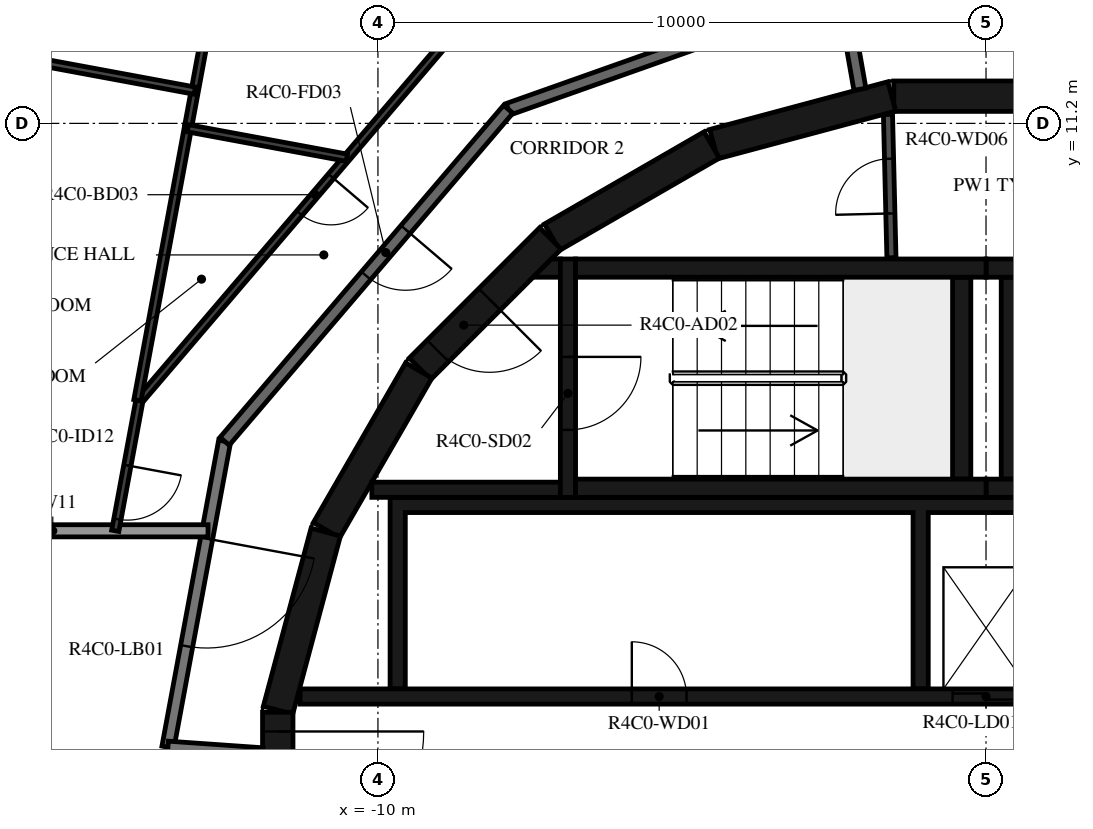
"""IFC4 building model, lengths in metres.
Left out: names, types, materials, properties, quantities, classifications, styles, units other than length and angle.
Written with IfcOpenShell. Run it as: python <this file> out.ifc"""

import sys

from ifc_helpers import new_model, si_unit, direction, frame, frame_2d, origin, place, context, subcontext, project, spatial, polyline, rectangle, outline, extrude, element, fill, save


model = new_model("IFC4")
c1 = context("Model", 3, precision=1e-05, world=origin(), true_north=direction((0.0, 1.0)))
c2 = subcontext(c1, "Body", "Model", "MODEL_VIEW")
j1 = project(units=[si_unit("LENGTHUNIT", "METRE"), si_unit("PLANEANGLEUNIT", "RADIAN")], contexts=[c1])
p1 = place(None, origin())
s1 = spatial("IfcSite", under=j1, at=p1, CompositionType="ELEMENT")
p2 = place(p1, origin())
s2 = spatial("IfcBuilding", under=s1, at=p2, CompositionType="ELEMENT")
p3 = place(p2, frame((0.0, 0.0, 172.7)))
s3 = spatial("IfcBuildingStorey", under=s2, at=p3, CompositionType="ELEMENT", Elevation=172.7)
for number, where, z_axis, x_axis in (
    (1, (1.516, 11.647, 0.0), (0.0, 0.0, 1.0), (-1.0, 0.0, 0.0)),
    (2, (-1.55, 11.643, 0.0), (0.0, 0.0, 1.0), (-0.966, -0.259, 0.0)),
    (3, (-4.51, 10.845, 0.0), (0.0, 0.0, 1.0), (-0.866, -0.5, 0.0)),
):
    element("IfcWall", number, at=place(p3, frame(where, z_axis=z_axis, x_axis=x_axis)), inside=s3, PredefinedType="SHEAR", context=c2, shape_type="SweptSolid", body=[
        extrude(rectangle(XDim=3.033, YDim=0.5, at=frame_2d((1.516, 0.0))), origin(), (0.0, 0.0, 1.0), 3.12),
    ])
p4 = place(p3, frame((-7.164, 9.308, 0.0), z_axis=(0.0, 0.0, 1.0), x_axis=(-0.707106781187, -0.707106781187, 0.0)))
e4 = element("IfcWall", 4, at=p4, inside=s3, PredefinedType="SHEAR", context=c2, shape_type="SweptSolid", body=[
    extrude(rectangle(XDim=3.032, YDim=0.5, at=frame_2d((1.516, 0.0))), origin(), (0.0, 0.0, 1.0), 3.12),
])
p5 = place(p4, frame((1.416, 0.0, 0.0)))
e5 = element("IfcOpeningElement", 5, at=p5, cuts=e4, PredefinedType="OPENING", context=c2, shape_type="SweptSolid", body=[
    extrude(rectangle(XDim=1.2, YDim=2.1, at=frame_2d((0.6, 1.05))), frame((0.0, 0.26, 0.0), z_axis=(0.0, -1.0, 0.0), x_axis=(1.0, 0.0, 0.0)), (0.0, 0.0, 1.0), 0.52),
])
for number, where, z_axis, x_axis in (
    (6, (-9.329, 7.137, 0.0), (0.0, 0.0, 1.0), (-0.5, -0.866, 0.0)),
    (7, (-10.858, 4.479, 0.0), (0.0, 0.0, 1.0), (-0.259, -0.966, 0.0)),
):
    element("IfcWall", number, at=place(p3, frame(where, z_axis=z_axis, x_axis=x_axis)), inside=s3, PredefinedType="SHEAR", context=c2, shape_type="SweptSolid", body=[
        extrude(rectangle(XDim=3.033, YDim=0.5, at=frame_2d((1.516, 0.0))), origin(), (0.0, 0.0, 1.0), 3.12),
    ])
p6 = place(p3, frame((-11.647, 1.516, 0.0), z_axis=(0.0, 0.0, 1.0), x_axis=(0.0, -1.0, 0.0)))
e8 = element("IfcWall", 8, at=p6, inside=s3, PredefinedType="SHEAR", context=c2, shape_type="SweptSolid", body=[
    extrude(rectangle(XDim=3.033, YDim=0.5, at=frame_2d((1.516, 0.0))), origin(), (0.0, 0.0, 1.0), 3.12),
])
p7 = place(p6, frame((0.316, 0.0, 0.0)))
e9 = element("IfcOpeningElement", 9, at=p7, cuts=e8, PredefinedType="OPENING", context=c2, shape_type="SweptSolid", body=[
    extrude(rectangle(XDim=2.4, YDim=2.1, at=frame_2d((1.2, 1.05))), frame((0.0, 0.26, 0.0), z_axis=(0.0, -1.0, 0.0), x_axis=(1.0, 0.0, 0.0)), (0.0, 0.0, 1.0), 0.52),
])
for number, where, z_axis, x_axis in (
    (10, (0.0, 5.2, 0.0), (0.0, 0.0, 1.0), (1.0, 0.0, 0.0)),
    (11, (0.0, 8.82, 0.0), (0.0, 0.0, 1.0), (1.0, 0.0, 0.0)),
):
    element("IfcWall", number, at=place(p3, frame(where, z_axis=z_axis, x_axis=x_axis)), inside=s3, PredefinedType="SHEAR", context=c2, shape_type="SweptSolid", body=[
        extrude(rectangle(XDim=6.75, YDim=0.3, at=frame_2d((3.375, 0.0))), origin(), (0.0, 0.0, 1.0), 3.12),
    ])
p8 = place(p3, frame((0.4, 5.35, 0.0), z_axis=(0.0, 0.0, 1.0), x_axis=(0.0, 1.0, 0.0)))
e12 = element("IfcWall", 12, at=p8, inside=s3, PredefinedType="SHEAR", context=c2, shape_type="SweptSolid", body=[
    extrude(rectangle(XDim=3.32, YDim=0.3, at=frame_2d((1.66, 0.0))), origin(), (0.0, 0.0, 1.0), 3.12),
])
for number, where, z_axis, x_axis in (
    (13, (-6.75, 5.2, 0.0), (0.0, 0.0, 1.0), (1.0, 0.0, 0.0)),
    (14, (-6.75, 8.82, 0.0), (0.0, 0.0, 1.0), (1.0, 0.0, 0.0)),
):
    element("IfcWall", number, at=place(p3, frame(where, z_axis=z_axis, x_axis=x_axis)), inside=s3, PredefinedType="SHEAR", context=c2, shape_type="SweptSolid", body=[
        extrude(rectangle(XDim=6.75, YDim=0.3, at=frame_2d((3.375, 0.0))), origin(), (0.0, 0.0, 1.0), 3.12),
    ])
p9 = place(p3, frame((-0.4, 5.35, 0.0), z_axis=(0.0, 0.0, 1.0), x_axis=(0.0, 1.0, 0.0)))
e15 = element("IfcWall", 15, at=p9, inside=s3, PredefinedType="SHEAR", context=c2, shape_type="SweptSolid", body=[
    extrude(rectangle(XDim=3.32, YDim=0.3, at=frame_2d((1.66, 0.0))), origin(), (0.0, 0.0, 1.0), 3.12),
])
p10 = place(p3, frame((-6.875, 8.97, 0.0), z_axis=(0.0, 0.0, 1.0), x_axis=(0.0, -1.0, 0.0)))
e16 = element("IfcWall", 16, at=p10, inside=s3, PredefinedType="SHEAR", context=c2, shape_type="SweptSolid", body=[
    extrude(rectangle(XDim=3.92, YDim=0.25, at=frame_2d((1.96, 0.0))), origin(), (0.0, 0.0, 1.0), 3.12),
])
p11 = place(p10, frame((1.61, 0.0, 0.0)))
e17 = element("IfcOpeningElement", 17, at=p11, cuts=e16, PredefinedType="OPENING", context=c2, shape_type="SweptSolid", body=[
    extrude(rectangle(XDim=1.2, YDim=2.1, at=frame_2d((0.6, 1.05))), frame((0.0, 0.135, 0.0), z_axis=(0.0, -1.0, 0.0), x_axis=(1.0, 0.0, 0.0)), (0.0, 0.0, 1.0), 0.27),
])
p12 = place(p3, frame((-7.0, 5.175, 0.0), z_axis=(0.0, 0.0, 1.0), x_axis=(-1.0, 0.0, 0.0)))
e18 = element("IfcWall", 18, at=p12, inside=s3, PredefinedType="SHEAR", context=c2, shape_type="SweptSolid", body=[
    extrude(rectangle(XDim=3.1, YDim=0.25, at=frame_2d((1.55, 0.0))), origin(), (0.0, 0.0, 1.0), 3.12),
])
p13 = place(p3, origin())
e19 = element("IfcWall", 19, at=p13, inside=s3, PredefinedType="SHEAR", context=c2, shape_type="SweptSolid", body=[
    extrude(outline(polyline([(-7.148, 8.97), (-7.0, 8.97), (-7.0, 8.67), (-7.448, 8.67), (-7.148, 8.97)])), origin(), (0.0, 0.0, 1.0), 3.12),
])
p14 = place(p3, origin())
e20 = element("IfcWall", 20, at=p14, inside=s3, PredefinedType="SHEAR", context=c2, shape_type="SweptSolid", body=[
    extrude(outline(polyline([(-9.55, 4.8), (-1.2, 4.8), (-1.2, 1.9), (-0.95, 1.9), (-0.95, 4.8), (0.95, 4.8), (0.95, 1.9), (1.2, 1.9), (1.2, 4.8), (3.1, 4.8), (3.1, 1.9), (3.35, 1.9), (3.35, 4.8), (5.25, 4.8), (5.25, 1.9), (5.5, 1.9), (5.5, 4.8), (7.4, 4.8), (7.4, 1.9), (7.65, 1.9), (7.65, 4.8), (9.55, 4.8), (9.55, 1.9), (9.8, 1.9), (9.8, 4.8), (9.8, 5.05), (-9.8, 5.05), (-9.8, 4.8), (-9.8, 1.9), (-9.55, 1.9), (-9.55, 4.8)])), origin(), (0.0, 0.0, 1.0), 3.12),
])
p15 = place(p3, frame((-11.28, 1.775, 0.0), z_axis=(0.0, 0.0, 1.0), x_axis=(1.0, 0.0, 0.0)))
e21 = element("IfcWall", 21, at=p15, inside=s3, PredefinedType="SHEAR", context=c2, shape_type="SweptSolid", body=[
    extrude(rectangle(XDim=14.38, YDim=0.25, at=frame_2d((7.19, 0.0))), origin(), (0.0, 0.0, 1.0), 3.12),
])
p16 = place(p15, frame((10.73, 0.0, 0.0)))
e22 = element("IfcOpeningElement", 22, at=p16, cuts=e21, PredefinedType="OPENING", context=c2, shape_type="SweptSolid", body=[
    extrude(rectangle(XDim=1.1, YDim=2.1, at=frame_2d((0.55, 1.05))), frame((0.0, 0.135, 0.0), z_axis=(0.0, -1.0, 0.0), x_axis=(1.0, 0.0, 0.0)), (0.0, 0.0, 1.0), 0.27),
])
p17 = place(p15, frame((12.88, 0.0, 0.0)))
e23 = element("IfcOpeningElement", 23, at=p17, cuts=e21, PredefinedType="OPENING", context=c2, shape_type="SweptSolid", body=[
    extrude(rectangle(XDim=1.1, YDim=2.1, at=frame_2d((0.55, 1.05))), frame((0.0, 0.135, 0.0), z_axis=(0.0, -1.0, 0.0), x_axis=(1.0, 0.0, 0.0)), (0.0, 0.0, 1.0), 0.27),
])
p18 = place(p15, frame((5.455, 0.0, 0.0)))
e24 = element("IfcOpeningElement", 24, at=p18, cuts=e21, PredefinedType="OPENING", context=c2, shape_type="SweptSolid", body=[
    extrude(rectangle(XDim=0.9, YDim=2.1, at=frame_2d((0.45, 1.05))), frame((0.0, 0.135, 0.0), z_axis=(0.0, -1.0, 0.0), x_axis=(1.0, 0.0, 0.0)), (0.0, 0.0, 1.0), 0.27),
])
p19 = place(p3, frame((-1.555, 8.99, 0.0), z_axis=(0.0, 0.0, 1.0), x_axis=(-0.024125549686, 0.999708936567, 0.0)))
e25 = element("IfcWall", 25, at=p19, inside=s3, PredefinedType="PARTITIONING", context=c2, shape_type="SweptSolid", body=[
    extrude(rectangle(XDim=2.358, YDim=0.15, at=frame_2d((1.179, 0.0))), origin(), (0.0, 0.0, 1.0), 3.12),
])
p20 = place(p19, frame((0.729, 0.0, 0.0)))
e26 = element("IfcOpeningElement", 26, at=p20, cuts=e25, PredefinedType="OPENING", context=c2, shape_type="SweptSolid", body=[
    extrude(rectangle(XDim=0.9, YDim=2.1, at=frame_2d((0.45, 1.05))), frame((0.0, 0.085, 0.0), z_axis=(0.0, -1.0, 0.0), x_axis=(1.0, 0.0, 0.0)), (0.0, 0.0, 1.0), 0.17),
])
p21 = place(p3, frame((-12.521, 5.972, 0.0), z_axis=(0.0, 0.0, 1.0), x_axis=(-0.182251559718, -0.983251935661, 0.0)))
e27 = element("IfcWall", 27, at=p21, inside=s3, PredefinedType="STANDARD", context=c2, shape_type="SweptSolid", body=[
    extrude(rectangle(XDim=5.117, YDim=0.2, at=frame_2d((2.559, 0.0))), origin(), (0.0, 0.0, 1.0), 3.12),
])
p22 = place(p21, frame((1.627, 0.0, 0.0)))
e28 = element("IfcOpeningElement", 28, at=p22, cuts=e27, PredefinedType="OPENING", context=c2, shape_type="SweptSolid", body=[
    extrude(rectangle(XDim=1.8, YDim=2.1, at=frame_2d((0.9, 1.05))), frame((0.0, 0.11, 0.0), z_axis=(0.0, -1.0, 0.0), x_axis=(1.0, 0.0, 0.0)), (0.0, 0.0, 1.0), 0.22),
])
p23 = place(p3, frame((-13.454, 0.941, 0.0), z_axis=(0.0, 0.0, 1.0), x_axis=(0.99755155062, -0.069934997354, 0.0)))
e29 = element("IfcWall", 29, at=p23, inside=s3, PredefinedType="STANDARD", context=c2, shape_type="SweptSolid", body=[
    extrude(rectangle(XDim=1.561, YDim=0.2, at=frame_2d((0.78, 0.0))), origin(), (0.0, 0.0, 1.0), 3.12),
])
p24 = place(p3, frame((-2.074, 11.761, 0.0), z_axis=(0.0, 0.0, 1.0), x_axis=(-0.1736412798, 0.984808969267, 0.0)))
e30 = element("IfcWall", 30, at=p24, inside=s3, PredefinedType="STANDARD", context=c2, shape_type="SweptSolid", body=[
    extrude(rectangle(XDim=1.644, YDim=0.2, at=frame_2d((0.822, 0.0))), origin(), (0.0, 0.0, 1.0), 3.12),
])
p25 = place(p3, frame((-2.359, 13.38, 0.0), z_axis=(0.0, 0.0, 1.0), x_axis=(-0.942647529236, -0.333789807551, 0.0)))
e31 = element("IfcWall", 31, at=p25, inside=s3, PredefinedType="STANDARD", context=c2, shape_type="SweptSolid", body=[
    extrude(rectangle(XDim=5.833, YDim=0.2, at=frame_2d((2.917, 0.0))), origin(), (0.0, 0.0, 1.0), 3.12),
])
p26 = place(p3, frame((-7.858, 11.433, 0.0), z_axis=(0.0, 0.0, 1.0), x_axis=(-0.649440801937, -0.760412154545, 0.0)))
e32 = element("IfcWall", 32, at=p26, inside=s3, PredefinedType="STANDARD", context=c2, shape_type="SweptSolid", body=[
    extrude(rectangle(XDim=7.181, YDim=0.2, at=frame_2d((3.59, 0.0))), origin(), (0.0, 0.0, 1.0), 3.12),
])
p27 = place(p26, frame((2.6, 0.0, 0.0)))
e33 = element("IfcOpeningElement", 33, at=p27, cuts=e32, PredefinedType="OPENING", context=c2, shape_type="SweptSolid", body=[
    extrude(rectangle(XDim=1.0, YDim=2.1, at=frame_2d((0.5, 1.05))), frame((0.0, 0.11, 0.0), z_axis=(0.0, -1.0, 0.0), x_axis=(1.0, 0.0, 0.0)), (0.0, 0.0, 1.0), 0.22),
])
p28 = place(p3, frame((-12.794, 4.5, 0.0), z_axis=(0.0, 0.0, 1.0), x_axis=(-1.0, 0.0, 0.0)))
e34 = element("IfcWall", 34, at=p28, inside=s3, PredefinedType="STANDARD", context=c2, shape_type="SweptSolid", body=[
    extrude(rectangle(XDim=5.106, YDim=0.2, at=frame_2d((2.553, 0.0))), origin(), (0.0, 0.0, 1.0), 2.73),
])
p29 = place(p3, frame((8.702, 12.206, 0.0), z_axis=(0.0, 0.0, 1.0), x_axis=(-0.760401313718, 0.649453494945, 0.0)))
e35 = element("IfcWall", 35, at=p29, inside=s3, PredefinedType="PARTITIONING", context=c2, shape_type="SweptSolid", body=[
    extrude(rectangle(XDim=16.724, YDim=0.12, at=frame_2d((8.362, 0.0))), origin(), (0.0, 0.0, 1.0), 3.12),
])
p30 = place(p29, frame((0.2, 0.0, 0.0)))
e36 = element("IfcOpeningElement", 36, at=p30, cuts=e35, PredefinedType="OPENING", context=c2, shape_type="SweptSolid", body=[
    extrude(rectangle(XDim=0.9, YDim=2.1, at=frame_2d((0.45, 1.05))), frame((0.0, 0.07, 0.0), z_axis=(0.0, -1.0, 0.0), x_axis=(1.0, 0.0, 0.0)), (0.0, 0.0, 1.0), 0.14),
])
p31 = place(p29, frame((8.02, 0.0, 0.0)))
e37 = element("IfcOpeningElement", 37, at=p31, cuts=e35, PredefinedType="OPENING", context=c2, shape_type="SweptSolid", body=[
    extrude(rectangle(XDim=0.9, YDim=2.1, at=frame_2d((0.45, 1.05))), frame((0.0, 0.07, 0.0), z_axis=(0.0, -1.0, 0.0), x_axis=(1.0, 0.0, 0.0)), (0.0, 0.0, 1.0), 0.14),
])
p32 = place(p29, frame((14.412, 0.0, 0.0)))
e38 = element("IfcOpeningElement", 38, at=p32, cuts=e35, PredefinedType="OPENING", context=c2, shape_type="SweptSolid", body=[
    extrude(rectangle(XDim=0.9, YDim=2.1, at=frame_2d((0.45, 1.05))), frame((0.0, 0.07, 0.0), z_axis=(0.0, -1.0, 0.0), x_axis=(1.0, 0.0, 0.0)), (0.0, 0.0, 1.0), 0.14),
])
p33 = place(p3, frame((-8.774, 12.669, 0.0), z_axis=(0.0, 0.0, 1.0), x_axis=(-0.649446157105, -0.760407580855, 0.0)))
e39 = element("IfcWall", 39, at=p33, inside=s3, PredefinedType="PARTITIONING", context=c2, shape_type="SweptSolid", body=[
    extrude(rectangle(XDim=7.927, YDim=0.12, at=frame_2d((3.964, 0.0))), origin(), (0.0, 0.0, 1.0), 3.12),
])
p34 = place(p33, frame((3.074, 0.0, 0.0)))
e40 = element("IfcOpeningElement", 40, at=p34, cuts=e39, PredefinedType="OPENING", context=c2, shape_type="SweptSolid", body=[
    extrude(rectangle(XDim=0.8, YDim=2.1, at=frame_2d((0.4, 1.05))), frame((0.0, 0.07, 0.0), z_axis=(0.0, -1.0, 0.0), x_axis=(1.0, 0.0, 0.0)), (0.0, 0.0, 1.0), 0.14),
])
p35 = place(p3, frame((-13.923, 6.641, 0.0), z_axis=(0.0, 0.0, 1.0), x_axis=(-0.182209715759, -0.983259690765, 0.0)))
e41 = element("IfcWall", 41, at=p35, inside=s3, PredefinedType="PARTITIONING", context=c2, shape_type="SweptSolid", body=[
    extrude(rectangle(XDim=2.177, YDim=0.12, at=frame_2d((1.089, 0.0))), origin(), (0.0, 0.0, 1.0), 3.12),
])
p36 = place(p35, frame((1.083, 0.0, 0.0)))
e42 = element("IfcOpeningElement", 42, at=p36, cuts=e41, PredefinedType="OPENING", context=c2, shape_type="SweptSolid", body=[
    extrude(rectangle(XDim=0.9, YDim=2.1, at=frame_2d((0.45, 1.05))), frame((0.0, 0.07, 0.0), z_axis=(0.0, -1.0, 0.0), x_axis=(1.0, 0.0, 0.0)), (0.0, 0.0, 1.0), 0.14),
])
p37 = place(p3, frame((-13.955, 6.647, 0.0), z_axis=(0.0, 0.0, 1.0), x_axis=(0.182264522222, 0.983249532896, 0.0)))
e43 = element("IfcWall", 43, at=p37, inside=s3, PredefinedType="PARTITIONING", context=c2, shape_type="SweptSolid", body=[
    extrude(rectangle(XDim=4.589, YDim=0.12, at=frame_2d((2.294, 0.0))), origin(), (0.0, 0.0, 1.0), 3.12),
])
p38 = place(p3, frame((-11.396, 20.453, 0.0), z_axis=(0.0, 0.0, 1.0), x_axis=(-0.182223370439, -0.983257160292, 0.0)))
e44 = element("IfcWall", 44, at=p38, inside=s3, PredefinedType="PARTITIONING", context=c2, shape_type="SweptSolid", body=[
    extrude(rectangle(XDim=9.452, YDim=0.12, at=frame_2d((4.726, 0.0))), origin(), (0.0, 0.0, 1.0), 3.12),
])
p39 = place(p38, frame((3.319, 0.0, 0.0)))
e45 = element("IfcOpeningElement", 45, at=p39, cuts=e44, PredefinedType="OPENING", context=c2, shape_type="SweptSolid", body=[
    extrude(rectangle(XDim=0.9, YDim=2.1, at=frame_2d((0.45, 1.05))), frame((0.0, 0.07, 0.0), z_axis=(0.0, -1.0, 0.0), x_axis=(1.0, 0.0, 0.0)), (0.0, 0.0, 1.0), 0.14),
])
p40 = place(p38, frame((0.2, 0.0, 0.0)))
e46 = element("IfcOpeningElement", 46, at=p40, cuts=e44, PredefinedType="OPENING", context=c2, shape_type="SweptSolid", body=[
    extrude(rectangle(XDim=0.9, YDim=2.1, at=frame_2d((0.45, 1.05))), frame((0.0, 0.07, 0.0), z_axis=(0.0, -1.0, 0.0), x_axis=(1.0, 0.0, 0.0)), (0.0, 0.0, 1.0), 0.14),
])
p41 = place(p3, frame((-13.126, 11.12, 0.0), z_axis=(0.0, 0.0, 1.0), x_axis=(0.983257646361, -0.182220747645, 0.0)))
e47 = element("IfcWall", 47, at=p41, inside=s3, PredefinedType="PARTITIONING", context=c2, shape_type="SweptSolid", body=[
    extrude(rectangle(XDim=2.659, YDim=0.12, at=frame_2d((1.33, 0.0))), origin(), (0.0, 0.0, 1.0), 3.12),
])
p42 = place(p3, frame((-16.552, 12.394, 0.0), z_axis=(0.0, 0.0, 1.0), x_axis=(0.983257712156, -0.182220392618, 0.0)))
e48 = element("IfcWall", 48, at=p42, inside=s3, PredefinedType="PARTITIONING", context=c2, shape_type="SweptSolid", body=[
    extrude(rectangle(XDim=3.6, YDim=0.12, at=frame_2d((1.8, 0.0))), origin(), (0.0, 0.0, 1.0), 2.73),
])
p43 = place(p11, origin())
e49 = element("IfcDoor", 49, at=p43, inside=s3, OperationType="SINGLE_SWING_LEFT", PredefinedType="DOOR", context=c2, shape_type="SweptSolid", body=[
    extrude(rectangle(XDim=1.2, YDim=2.1, at=frame_2d((0.6, 1.05))), frame((0.0, 0.025, 0.0), z_axis=(0.0, -1.0, 0.0), x_axis=(1.0, 0.0, 0.0)), (0.0, 0.0, 1.0), 0.05),
])
fill(e17, e49)
p44 = place(p5, origin())
e50 = element("IfcDoor", 50, at=p44, inside=s3, OperationType="SINGLE_SWING_RIGHT", PredefinedType="DOOR", context=c2, shape_type="SweptSolid", body=[
    extrude(rectangle(XDim=1.2, YDim=2.1, at=frame_2d((0.6, 1.05))), frame((0.0, 0.025, 0.0), z_axis=(0.0, -1.0, 0.0), x_axis=(1.0, 0.0, 0.0)), (0.0, 0.0, 1.0), 0.05),
])
fill(e5, e50)
p45 = place(p7, origin())
e51 = element("IfcDoor", 51, at=p45, inside=s3, OperationType="DOUBLE_DOOR_SINGLE_SWING", PredefinedType="DOOR", context=c2, shape_type="SweptSolid", body=[
    extrude(rectangle(XDim=2.4, YDim=2.1, at=frame_2d((1.2, 1.05))), frame((0.0, 0.025, 0.0), z_axis=(0.0, -1.0, 0.0), x_axis=(1.0, 0.0, 0.0)), (0.0, 0.0, 1.0), 0.05),
])
fill(e9, e51)
p46 = place(p16, origin())
e52 = element("IfcDoor", 52, at=p46, inside=s3, OperationType="DOUBLE_DOOR_SLIDING", PredefinedType="DOOR", context=c2, shape_type="SweptSolid", body=[
    extrude(rectangle(XDim=1.1, YDim=2.1, at=frame_2d((0.55, 1.05))), frame((0.0, 0.025, 0.0), z_axis=(0.0, -1.0, 0.0), x_axis=(1.0, 0.0, 0.0)), (0.0, 0.0, 1.0), 0.05),
])
fill(e22, e52)
p47 = place(p18, origin())
e53 = element("IfcDoor", 53, at=p47, inside=s3, OperationType="SINGLE_SWING_LEFT", PredefinedType="DOOR", context=c2, shape_type="SweptSolid", body=[
    extrude(rectangle(XDim=0.9, YDim=2.1, at=frame_2d((0.45, 1.05))), frame((0.0, 0.025, 0.0), z_axis=(0.0, -1.0, 0.0), x_axis=(1.0, 0.0, 0.0)), (0.0, 0.0, 1.0), 0.05),
])
fill(e24, e53)
p48 = place(p20, origin())
e54 = element("IfcDoor", 54, at=p48, inside=s3, OperationType="SINGLE_SWING_RIGHT", PredefinedType="DOOR", context=c2, shape_type="SweptSolid", body=[
    extrude(rectangle(XDim=0.9, YDim=2.1, at=frame_2d((0.45, 1.05))), frame((0.0, 0.025, 0.0), z_axis=(0.0, -1.0, 0.0), x_axis=(1.0, 0.0, 0.0)), (0.0, 0.0, 1.0), 0.05),
])
fill(e26, e54)
p49 = place(p27, origin())
e55 = element("IfcDoor", 55, at=p49, inside=s3, OperationType="SINGLE_SWING_LEFT", PredefinedType="DOOR", context=c2, shape_type="SweptSolid", body=[
    extrude(rectangle(XDim=1.0, YDim=2.1, at=frame_2d((0.5, 1.05))), frame((0.0, 0.025, 0.0), z_axis=(0.0, -1.0, 0.0), x_axis=(1.0, 0.0, 0.0)), (0.0, 0.0, 1.0), 0.05),
])
fill(e33, e55)
p50 = place(p34, origin())
e56 = element("IfcDoor", 56, at=p50, inside=s3, OperationType="SINGLE_SWING_LEFT", PredefinedType="DOOR", context=c2, shape_type="SweptSolid", body=[
    extrude(rectangle(XDim=0.8, YDim=2.1, at=frame_2d((0.4, 1.05))), frame((0.0, 0.025, 0.0), z_axis=(0.0, -1.0, 0.0), x_axis=(1.0, 0.0, 0.0)), (0.0, 0.0, 1.0), 0.05),
])
fill(e40, e56)
p51 = place(p36, origin())
e57 = element("IfcDoor", 57, at=p51, inside=s3, OperationType="SINGLE_SWING_LEFT", PredefinedType="DOOR", context=c2, shape_type="SweptSolid", body=[
    extrude(rectangle(XDim=0.9, YDim=2.1, at=frame_2d((0.45, 1.05))), frame((0.0, 0.025, 0.0), z_axis=(0.0, -1.0, 0.0), x_axis=(1.0, 0.0, 0.0)), (0.0, 0.0, 1.0), 0.05),
])
fill(e42, e57)
p52 = place(p22, origin())
e58 = element("IfcDoor", 58, at=p52, inside=s3, OperationType="DOUBLE_DOOR_SINGLE_SWING", PredefinedType="DOOR", context=c2, shape_type="SweptSolid", body=[
    extrude(rectangle(XDim=1.8, YDim=2.1, at=frame_2d((0.9, 1.05))), frame((0.0, 0.025, 0.0), z_axis=(0.0, -1.0, 0.0), x_axis=(1.0, 0.0, 0.0)), (0.0, 0.0, 1.0), 0.05),
])
fill(e28, e58)
save(model, sys.argv[1])
